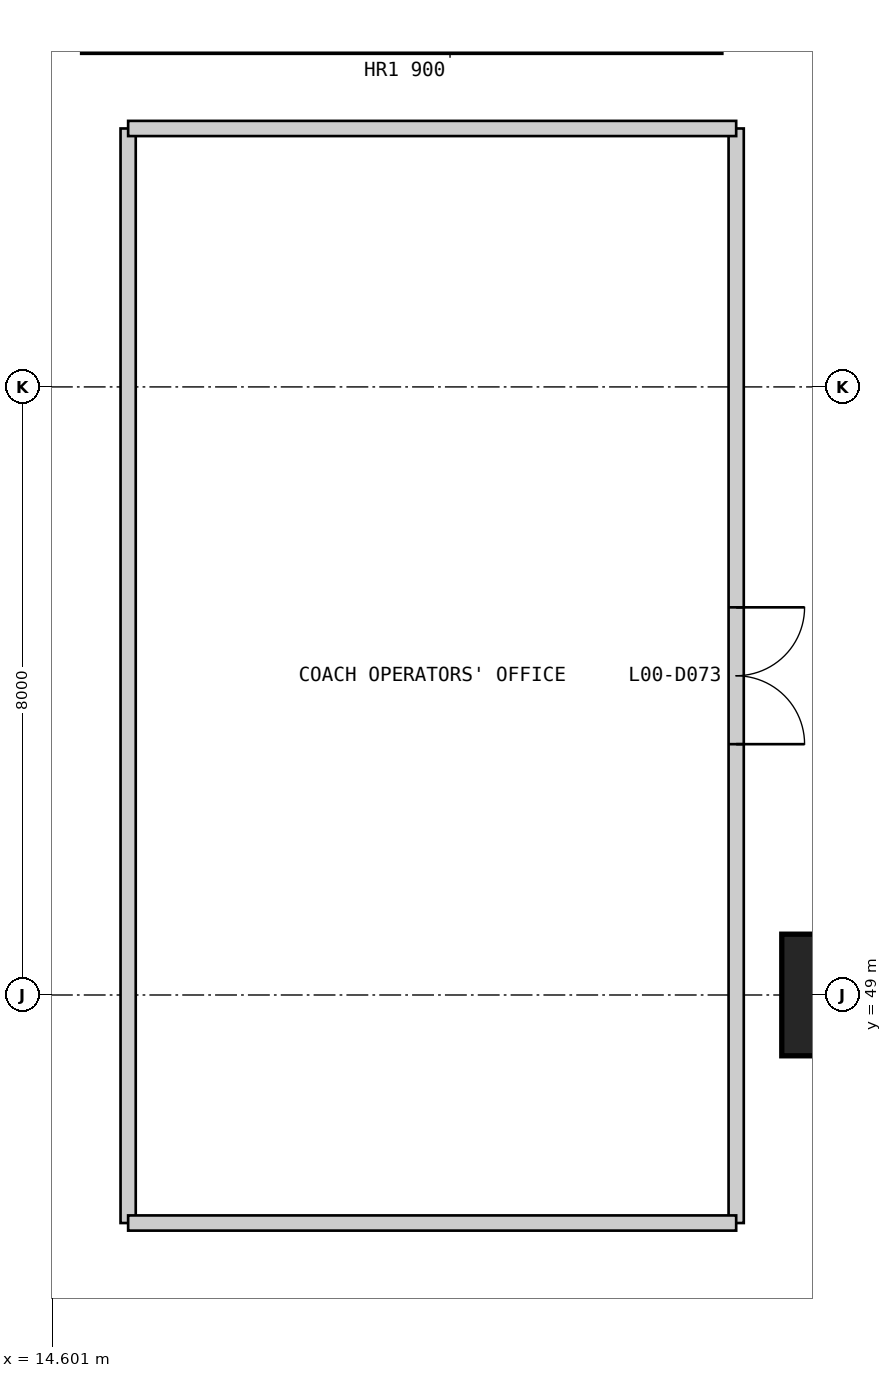
"""IFC4 building model, lengths in metres.
Left out: names, types, materials, properties, quantities, classifications, styles, units other than length and angle.
Written with IfcOpenShell. Run it as: python <this file> out.ifc"""

import sys

from ifc_helpers import new_model, si_unit, direction, frame, frame_2d, origin, origin_2d, place, context, subcontext, project, spatial, rectangle, extrude, element, fill, save


model = new_model("IFC4")
c1 = context("Model", 3, precision=1e-05, world=origin(), true_north=direction((0.0, 1.0)))
c2 = subcontext(c1, "Body", "Model", "MODEL_VIEW")
j1 = project(units=[si_unit("LENGTHUNIT", "METRE"), si_unit("PLANEANGLEUNIT", "RADIAN")], contexts=[c1])
p1 = place(None, origin())
s1 = spatial("IfcSite", under=j1, at=p1, CompositionType="ELEMENT")
p2 = place(p1, origin())
s2 = spatial("IfcBuilding", under=s1, at=p2, CompositionType="ELEMENT")
p3 = place(p2, origin())
s3 = spatial("IfcBuildingStorey", under=s2, at=p3, CompositionType="ELEMENT", Elevation=0.0)
p4 = place(p3, frame((25.0, 49.0, 0.0), z_axis=(0.0, 0.0, 1.0), x_axis=(1.0, 0.0, 0.0)))
e1 = element("IfcColumn", 1, at=p4, inside=s3, PredefinedType="COLUMN", context=c2, shape_type="SweptSolid", body=[
    extrude(rectangle(XDim=1.6, YDim=1.6, at=origin_2d()), origin(), (0.0, 0.0, 1.0), 7.0),
])
p5 = place(p3, frame((15.6, 46.0, 0.0), z_axis=(0.0, 0.0, 1.0), x_axis=(0.0, 1.0, 0.0)))
e2 = element("IfcWall", 2, at=p5, inside=s3, PredefinedType="PARTITIONING", context=c2, shape_type="SweptSolid", body=[
    extrude(rectangle(XDim=14.4, YDim=0.2, at=frame_2d((7.2, 0.0))), origin(), (0.0, 0.0, 1.0), 6.7),
])
p6 = place(p3, frame((23.6, 46.0, 0.0), z_axis=(0.0, 0.0, 1.0), x_axis=(0.0, 1.0, 0.0)))
e3 = element("IfcWall", 3, at=p6, inside=s3, PredefinedType="PARTITIONING", context=c2, shape_type="SweptSolid", body=[
    extrude(rectangle(XDim=14.4, YDim=0.2, at=frame_2d((7.2, 0.0))), origin(), (0.0, 0.0, 1.0), 6.7),
])
p7 = place(p6, frame((6.3, 0.0, 0.0)))
e4 = element("IfcOpeningElement", 4, at=p7, cuts=e3, PredefinedType="OPENING", context=c2, shape_type="SweptSolid", body=[
    extrude(rectangle(XDim=1.8, YDim=2.4, at=frame_2d((0.9, 1.2))), frame((0.0, 0.11, 0.0), z_axis=(0.0, -1.0, 0.0), x_axis=(1.0, 0.0, 0.0)), (0.0, 0.0, 1.0), 0.22),
])
for number, where, z_axis, x_axis in (
    (5, (15.6, 46.0, 0.0), (0.0, 0.0, 1.0), (1.0, 0.0, 0.0)),
    (6, (15.6, 60.4, 0.0), (0.0, 0.0, 1.0), (1.0, 0.0, 0.0)),
):
    element("IfcWall", number, at=place(p3, frame(where, z_axis=z_axis, x_axis=x_axis)), inside=s3, PredefinedType="PARTITIONING", context=c2, shape_type="SweptSolid", body=[
        extrude(rectangle(XDim=8.0, YDim=0.2, at=frame_2d((4.0, 0.0))), origin(), (0.0, 0.0, 1.0), 6.7),
    ])
p8 = place(p7, frame((1.8, 0.0, 0.0), z_axis=(0.0, 0.0, 1.0), x_axis=(-1.0, 0.0, 0.0)))
e7 = element("IfcDoor", 7, at=p8, inside=s3, OperationType="DOUBLE_DOOR_SINGLE_SWING", PredefinedType="DOOR", context=c2, shape_type="SweptSolid", body=[
    extrude(rectangle(XDim=1.8, YDim=2.4, at=frame_2d((0.9, 1.2))), frame((0.0, 0.025, 0.0), z_axis=(0.0, -1.0, 0.0), x_axis=(1.0, 0.0, 0.0)), (0.0, 0.0, 1.0), 0.05),
])
fill(e4, e7)
save(model, sys.argv[1])
